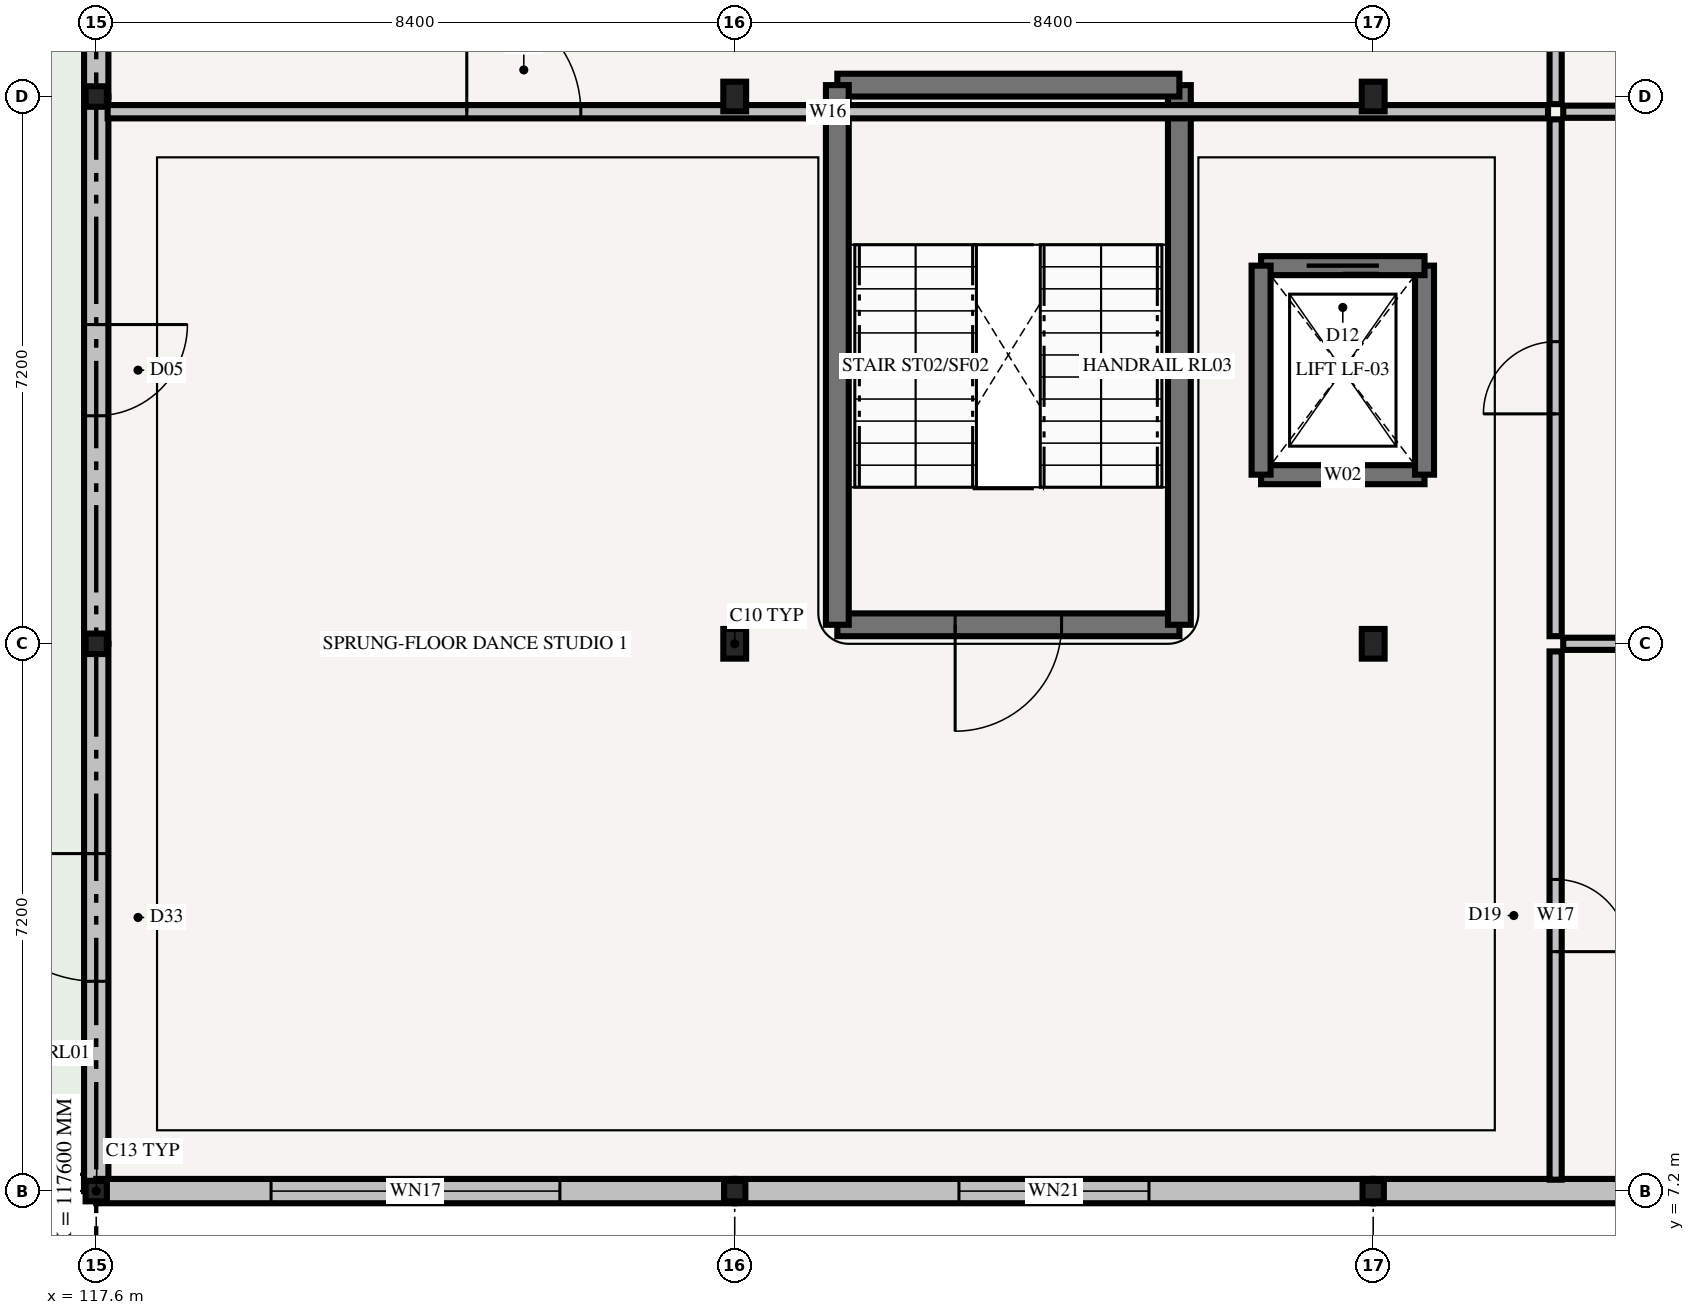
"""IFC4 building model, lengths in metres.
Left out: names, types, materials, properties, quantities, classifications, styles, units other than length and angle.
Written with IfcOpenShell. Run it as: python <this file> out.ifc"""

import sys

from ifc_helpers import new_model, si_unit, direction, frame, frame_2d, origin, origin_2d, place, context, subcontext, project, spatial, rectangle, i_section, extrude, element, fill, save


model = new_model("IFC4")
c1 = context("Model", 3, precision=1e-05, world=origin(), true_north=direction((0.0, 1.0)))
c2 = subcontext(c1, "Body", "Model", "MODEL_VIEW")
j1 = project(units=[si_unit("LENGTHUNIT", "METRE"), si_unit("PLANEANGLEUNIT", "RADIAN")], contexts=[c1])
p1 = place(None, origin())
s1 = spatial("IfcSite", under=j1, at=p1, CompositionType="ELEMENT")
p2 = place(p1, origin())
s2 = spatial("IfcBuilding", under=s1, at=p2, CompositionType="ELEMENT")
p3 = place(p2, frame((0.0, 0.0, 8.7)))
s3 = spatial("IfcBuildingStorey", under=s2, at=p3, CompositionType="ELEMENT", Elevation=8.7)
for number, where, z_axis, x_axis in (
    (1, (117.6, 7.2, 0.0), (0.0, 0.0, 1.0), (1.0, 0.0, 0.0)),
    (2, (117.6, 14.4, 0.0), (0.0, 0.0, 1.0), (1.0, 0.0, 0.0)),
    (3, (117.6, 21.6, 0.0), (0.0, 0.0, 1.0), (1.0, 0.0, 0.0)),
    (4, (126.0, 7.2, 0.0), (0.0, 0.0, 1.0), (1.0, 0.0, 0.0)),
):
    element("IfcColumn", number, at=place(p3, frame(where, z_axis=z_axis, x_axis=x_axis)), inside=s3, PredefinedType="COLUMN", context=c2, shape_type="SweptSolid", body=[
        extrude(i_section(OverallWidth=0.28, OverallDepth=0.27, WebThickness=0.008, FlangeThickness=0.013, FilletRadius=0.024, at=origin_2d()), origin(), (0.0, 0.0, 1.0), 4.2),
    ])
for number, where, z_axis, x_axis in (
    (5, (126.0, 14.4, 0.0), (0.0, 0.0, 1.0), (1.0, 0.0, 0.0)),
    (6, (126.0, 21.6, 0.0), (0.0, 0.0, 1.0), (1.0, 0.0, 0.0)),
):
    element("IfcColumn", number, at=place(p3, frame(where, z_axis=z_axis, x_axis=x_axis)), inside=s3, PredefinedType="COLUMN", context=c2, shape_type="SweptSolid", body=[
        extrude(i_section(OverallWidth=0.3, OverallDepth=0.39, WebThickness=0.011, FlangeThickness=0.019, FilletRadius=0.027, at=origin_2d()), origin(), (0.0, 0.0, 1.0), 4.2),
    ])
p4 = place(p3, frame((134.4, 7.2, 0.0), z_axis=(0.0, 0.0, 1.0), x_axis=(1.0, 0.0, 0.0)))
e7 = element("IfcColumn", 7, at=p4, inside=s3, PredefinedType="COLUMN", context=c2, shape_type="SweptSolid", body=[
    extrude(i_section(OverallWidth=0.28, OverallDepth=0.27, WebThickness=0.008, FlangeThickness=0.013, FilletRadius=0.024, at=origin_2d()), origin(), (0.0, 0.0, 1.0), 4.2),
])
for number, where, z_axis, x_axis in (
    (8, (134.4, 14.4, 0.0), (0.0, 0.0, 1.0), (1.0, 0.0, 0.0)),
    (9, (134.4, 21.6, 0.0), (0.0, 0.0, 1.0), (1.0, 0.0, 0.0)),
):
    element("IfcColumn", number, at=place(p3, frame(where, z_axis=z_axis, x_axis=x_axis)), inside=s3, PredefinedType="COLUMN", context=c2, shape_type="SweptSolid", body=[
        extrude(i_section(OverallWidth=0.3, OverallDepth=0.39, WebThickness=0.011, FlangeThickness=0.019, FilletRadius=0.027, at=origin_2d()), origin(), (0.0, 0.0, 1.0), 4.2),
    ])
p5 = place(p3, frame((117.6, 28.8, 0.0), z_axis=(0.0, 0.0, 1.0), x_axis=(0.0, -1.0, 0.0)))
e10 = element("IfcWall", 10, at=p5, inside=s3, PredefinedType="STANDARD", context=c2, shape_type="SweptSolid", body=[
    extrude(rectangle(XDim=7.2, YDim=0.32, at=frame_2d((3.6, 0.0))), origin(), (0.0, 0.0, 1.0), 3.305),
])
p6 = place(p5, frame((2.8, 0.0, 0.0)))
e11 = element("IfcOpeningElement", 11, at=p6, cuts=e10, PredefinedType="OPENING", context=c2, shape_type="SweptSolid", body=[
    extrude(rectangle(XDim=1.6, YDim=2.3, at=frame_2d((0.8, 1.15))), frame((0.0, 0.185, 0.0), z_axis=(0.0, -1.0, 0.0), x_axis=(1.0, 0.0, 0.0)), (0.0, 0.0, 1.0), 0.37),
])
p7 = place(p3, frame((117.6, 21.6, 0.0), z_axis=(0.0, 0.0, 1.0), x_axis=(0.0, -1.0, 0.0)))
e12 = element("IfcWall", 12, at=p7, inside=s3, PredefinedType="STANDARD", context=c2, shape_type="SweptSolid", body=[
    extrude(rectangle(XDim=7.2, YDim=0.32, at=frame_2d((3.6, 0.0))), origin(), (0.0, 0.0, 1.0), 3.405),
])
p8 = place(p7, frame((3.0, 0.0, 0.0)))
e13 = element("IfcOpeningElement", 13, at=p8, cuts=e12, PredefinedType="OPENING", context=c2, shape_type="SweptSolid", body=[
    extrude(rectangle(XDim=1.2, YDim=2.25, at=frame_2d((0.6, 1.125))), frame((0.0, 0.185, 0.0), z_axis=(0.0, -1.0, 0.0), x_axis=(1.0, 0.0, 0.0)), (0.0, 0.0, 1.0), 0.37),
])
p9 = place(p3, frame((117.6, 14.4, 0.0), z_axis=(0.0, 0.0, 1.0), x_axis=(0.0, -1.0, 0.0)))
e14 = element("IfcWall", 14, at=p9, inside=s3, PredefinedType="STANDARD", context=c2, shape_type="SweptSolid", body=[
    extrude(rectangle(XDim=7.2, YDim=0.32, at=frame_2d((3.6, 0.0))), origin(), (0.0, 0.0, 1.0), 3.455),
])
p10 = place(p9, frame((2.76, 0.0, 0.0)))
e15 = element("IfcOpeningElement", 15, at=p10, cuts=e14, PredefinedType="OPENING", context=c2, shape_type="SweptSolid", body=[
    extrude(rectangle(XDim=1.68, YDim=2.3, at=frame_2d((0.84, 1.15))), frame((0.0, 0.185, 0.0), z_axis=(0.0, -1.0, 0.0), x_axis=(1.0, 0.0, 0.0)), (0.0, 0.0, 1.0), 0.37),
])
p11 = place(p3, frame((117.6, 7.2, 0.0), z_axis=(0.0, 0.0, 1.0), x_axis=(1.0, 0.0, 0.0)))
e16 = element("IfcWall", 16, at=p11, inside=s3, PredefinedType="STANDARD", context=c2, shape_type="SweptSolid", body=[
    extrude(rectangle(XDim=8.4, YDim=0.32, at=frame_2d((4.2, 0.0))), origin(), (0.0, 0.0, 1.0), 3.405),
])
p12 = place(p11, frame((2.3, 0.0, 0.85)))
e17 = element("IfcOpeningElement", 17, at=p12, cuts=e16, PredefinedType="OPENING", context=c2, shape_type="SweptSolid", body=[
    extrude(rectangle(XDim=3.8, YDim=2.1, at=frame_2d((1.9, 1.05))), frame((0.0, 0.185, 0.0), z_axis=(0.0, -1.0, 0.0), x_axis=(1.0, 0.0, 0.0)), (0.0, 0.0, 1.0), 0.37),
])
p13 = place(p3, frame((126.0, 7.2, 0.0), z_axis=(0.0, 0.0, 1.0), x_axis=(1.0, 0.0, 0.0)))
e18 = element("IfcWall", 18, at=p13, inside=s3, PredefinedType="STANDARD", context=c2, shape_type="SweptSolid", body=[
    extrude(rectangle(XDim=8.4, YDim=0.32, at=frame_2d((4.2, 0.0))), origin(), (0.0, 0.0, 1.0), 3.405),
])
p14 = place(p13, frame((2.95, 0.0, 0.85)))
e19 = element("IfcOpeningElement", 19, at=p14, cuts=e18, PredefinedType="OPENING", context=c2, shape_type="SweptSolid", body=[
    extrude(rectangle(XDim=2.5, YDim=1.65, at=frame_2d((1.25, 0.825))), frame((0.0, 0.185, 0.0), z_axis=(0.0, -1.0, 0.0), x_axis=(1.0, 0.0, 0.0)), (0.0, 0.0, 1.0), 0.37),
])
p15 = place(p3, frame((134.4, 7.2, 0.0), z_axis=(0.0, 0.0, 1.0), x_axis=(1.0, 0.0, 0.0)))
e20 = element("IfcWall", 20, at=p15, inside=s3, PredefinedType="STANDARD", context=c2, shape_type="SweptSolid", body=[
    extrude(rectangle(XDim=8.4, YDim=0.32, at=frame_2d((4.2, 0.0))), origin(), (0.0, 0.0, 1.0), 3.455),
])
p16 = place(p15, frame((3.5, 0.0, 0.85)))
e21 = element("IfcOpeningElement", 21, at=p16, cuts=e20, PredefinedType="OPENING", context=c2, shape_type="SweptSolid", body=[
    extrude(rectangle(XDim=1.4, YDim=1.2, at=frame_2d((0.7, 0.6))), frame((0.0, 0.185, 0.0), z_axis=(0.0, -1.0, 0.0), x_axis=(1.0, 0.0, 0.0)), (0.0, 0.0, 1.0), 0.37),
])
p17 = place(p3, frame((127.35, 14.65, 0.0), z_axis=(0.0, 0.0, 1.0), x_axis=(1.0, 0.0, 0.0)))
e22 = element("IfcWall", 22, at=p17, inside=s3, PredefinedType="SHEAR", context=c2, shape_type="SweptSolid", body=[
    extrude(rectangle(XDim=4.5, YDim=0.3, at=frame_2d((2.25, 0.0))), origin(), (0.0, 0.0, 1.0), 4.0),
])
p18 = place(p17, frame((1.55, 0.0, 0.0)))
e23 = element("IfcOpeningElement", 23, at=p18, cuts=e22, PredefinedType="OPENING", context=c2, shape_type="SweptSolid", body=[
    extrude(rectangle(XDim=1.4, YDim=2.2, at=frame_2d((0.7, 1.1))), frame((0.0, 0.175, 0.0), z_axis=(0.0, -1.0, 0.0), x_axis=(1.0, 0.0, 0.0)), (0.0, 0.0, 1.0), 0.35),
])
p19 = place(p3, frame((131.85, 14.65, 0.0), z_axis=(0.0, 0.0, 1.0), x_axis=(0.0, 1.0, 0.0)))
e24 = element("IfcWall", 24, at=p19, inside=s3, PredefinedType="SHEAR", context=c2, shape_type="SweptSolid", body=[
    extrude(rectangle(XDim=7.1, YDim=0.3, at=frame_2d((3.55, 0.0))), origin(), (0.0, 0.0, 1.0), 4.0),
])
p20 = place(p3, frame((131.85, 21.75, 0.0), z_axis=(0.0, 0.0, 1.0), x_axis=(-1.0, 0.0, 0.0)))
e25 = element("IfcWall", 25, at=p20, inside=s3, PredefinedType="SHEAR", context=c2, shape_type="SweptSolid", body=[
    extrude(rectangle(XDim=4.5, YDim=0.3, at=frame_2d((2.25, 0.0))), origin(), (0.0, 0.0, 1.0), 4.0),
])
p21 = place(p3, frame((127.35, 21.75, 0.0), z_axis=(0.0, 0.0, 1.0), x_axis=(0.0, -1.0, 0.0)))
e26 = element("IfcWall", 26, at=p21, inside=s3, PredefinedType="SHEAR", context=c2, shape_type="SweptSolid", body=[
    extrude(rectangle(XDim=7.1, YDim=0.3, at=frame_2d((3.55, 0.0))), origin(), (0.0, 0.0, 1.0), 4.0),
])
p22 = place(p3, frame((132.925, 16.625, 0.0), z_axis=(0.0, 0.0, 1.0), x_axis=(1.0, 0.0, 0.0)))
e27 = element("IfcWall", 27, at=p22, inside=s3, PredefinedType="SHEAR", context=c2, shape_type="SweptSolid", body=[
    extrude(rectangle(XDim=2.15, YDim=0.25, at=frame_2d((1.075, 0.0))), origin(), (0.0, 0.0, 1.0), 4.0),
])
p23 = place(p3, frame((135.075, 16.625, 0.0), z_axis=(0.0, 0.0, 1.0), x_axis=(0.0, 1.0, 0.0)))
e28 = element("IfcWall", 28, at=p23, inside=s3, PredefinedType="SHEAR", context=c2, shape_type="SweptSolid", body=[
    extrude(rectangle(XDim=2.75, YDim=0.25, at=frame_2d((1.375, 0.0))), origin(), (0.0, 0.0, 1.0), 4.0),
])
p24 = place(p3, frame((135.075, 19.375, 0.0), z_axis=(0.0, 0.0, 1.0), x_axis=(-1.0, 0.0, 0.0)))
e29 = element("IfcWall", 29, at=p24, inside=s3, PredefinedType="SHEAR", context=c2, shape_type="SweptSolid", body=[
    extrude(rectangle(XDim=2.15, YDim=0.25, at=frame_2d((1.075, 0.0))), origin(), (0.0, 0.0, 1.0), 4.0),
])
p25 = place(p24, frame((0.6, 0.0, 0.0)))
e30 = element("IfcOpeningElement", 30, at=p25, cuts=e29, PredefinedType="OPENING", context=c2, shape_type="SweptSolid", body=[
    extrude(rectangle(XDim=0.95, YDim=2.1, at=frame_2d((0.475, 1.05))), frame((0.0, 0.15, 0.0), z_axis=(0.0, -1.0, 0.0), x_axis=(1.0, 0.0, 0.0)), (0.0, 0.0, 1.0), 0.3),
])
p26 = place(p3, frame((132.925, 19.375, 0.0), z_axis=(0.0, 0.0, 1.0), x_axis=(0.0, -1.0, 0.0)))
e31 = element("IfcWall", 31, at=p26, inside=s3, PredefinedType="SHEAR", context=c2, shape_type="SweptSolid", body=[
    extrude(rectangle(XDim=2.75, YDim=0.25, at=frame_2d((1.375, 0.0))), origin(), (0.0, 0.0, 1.0), 4.0),
])
p27 = place(p3, frame((117.75, 21.4, 0.0), z_axis=(0.0, 0.0, 1.0), x_axis=(1.0, 0.0, 0.0)))
e32 = element("IfcWall", 32, at=p27, inside=s3, PredefinedType="PARTITIONING", context=c2, shape_type="SweptSolid", body=[
    extrude(rectangle(XDim=18.95, YDim=0.175, at=frame_2d((9.475, 0.0))), origin(), (0.0, 0.0, 1.0), 3.32),
])
p28 = place(p27, frame((4.725, 0.0, 0.0)))
e33 = element("IfcOpeningElement", 33, at=p28, cuts=e32, PredefinedType="OPENING", context=c2, shape_type="SweptSolid", body=[
    extrude(rectangle(XDim=1.5, YDim=2.2, at=frame_2d((0.75, 1.1))), frame((0.0, 0.112, 0.0), z_axis=(0.0, -1.0, 0.0), x_axis=(1.0, 0.0, 0.0)), (0.0, 0.0, 1.0), 0.225),
])
p29 = place(p3, frame((136.8, 7.35, 0.0), z_axis=(0.0, 0.0, 1.0), x_axis=(0.0, 1.0, 0.0)))
e34 = element("IfcWall", 34, at=p29, inside=s3, PredefinedType="PARTITIONING", context=c2, shape_type="SweptSolid", body=[
    extrude(rectangle(XDim=6.95, YDim=0.16, at=frame_2d((3.475, 0.0))), origin(), (0.0, 0.0, 1.0), 3.32),
])
p30 = place(p29, frame((3.0, 0.0, 0.0)))
e35 = element("IfcOpeningElement", 35, at=p30, cuts=e34, PredefinedType="OPENING", context=c2, shape_type="SweptSolid", body=[
    extrude(rectangle(XDim=0.95, YDim=2.15, at=frame_2d((0.475, 1.075))), frame((0.0, 0.105, 0.0), z_axis=(0.0, -1.0, 0.0), x_axis=(1.0, 0.0, 0.0)), (0.0, 0.0, 1.0), 0.21),
])
p31 = place(p3, frame((136.8, 14.5, 0.0), z_axis=(0.0, 0.0, 1.0), x_axis=(0.0, 1.0, 0.0)))
e36 = element("IfcWall", 36, at=p31, inside=s3, PredefinedType="PARTITIONING", context=c2, shape_type="SweptSolid", body=[
    extrude(rectangle(XDim=6.8, YDim=0.16, at=frame_2d((3.4, 0.0))), origin(), (0.0, 0.0, 1.0), 3.32),
])
p32 = place(p31, frame((2.925, 0.0, 0.0)))
e37 = element("IfcOpeningElement", 37, at=p32, cuts=e36, PredefinedType="OPENING", context=c2, shape_type="SweptSolid", body=[
    extrude(rectangle(XDim=0.95, YDim=2.15, at=frame_2d((0.475, 1.075))), frame((0.0, 0.105, 0.0), z_axis=(0.0, -1.0, 0.0), x_axis=(1.0, 0.0, 0.0)), (0.0, 0.0, 1.0), 0.21),
])
p33 = place(p3, frame((136.8, 21.5, 0.0), z_axis=(0.0, 0.0, 1.0), x_axis=(0.0, 1.0, 0.0)))
e38 = element("IfcWall", 38, at=p33, inside=s3, PredefinedType="PARTITIONING", context=c2, shape_type="SweptSolid", body=[
    extrude(rectangle(XDim=5.3, YDim=0.16, at=frame_2d((2.65, 0.0))), origin(), (0.0, 0.0, 1.0), 3.32),
])
p34 = place(p33, frame((2.15, 0.0, 0.0)))
e39 = element("IfcOpeningElement", 39, at=p34, cuts=e38, PredefinedType="OPENING", context=c2, shape_type="SweptSolid", body=[
    extrude(rectangle(XDim=1.0, YDim=2.15, at=frame_2d((0.5, 1.075))), frame((0.0, 0.105, 0.0), z_axis=(0.0, -1.0, 0.0), x_axis=(1.0, 0.0, 0.0)), (0.0, 0.0, 1.0), 0.21),
])
for number, where, z_axis, x_axis in (
    (40, (136.9, 14.4, 0.0), (0.0, 0.0, 1.0), (1.0, 0.0, 0.0)),
    (41, (136.9, 21.4, 0.0), (0.0, 0.0, 1.0), (1.0, 0.0, 0.0)),
):
    element("IfcWall", number, at=place(p3, frame(where, z_axis=z_axis, x_axis=x_axis)), inside=s3, PredefinedType="PARTITIONING", context=c2, shape_type="SweptSolid", body=[
        extrude(rectangle(XDim=5.9, YDim=0.16, at=frame_2d((2.95, 0.0))), origin(), (0.0, 0.0, 1.0), 3.32),
    ])
p35 = place(p8, frame((1.2, 0.0, 0.0), z_axis=(0.0, 0.0, 1.0), x_axis=(-1.0, 0.0, 0.0)))
e42 = element("IfcDoor", 42, at=p35, inside=s3, OperationType="SINGLE_SWING_LEFT", PredefinedType="DOOR", context=c2, shape_type="SweptSolid", body=[
    extrude(rectangle(XDim=1.2, YDim=2.25, at=frame_2d((0.6, 1.125))), frame((0.0, 0.025, 0.0), z_axis=(0.0, -1.0, 0.0), x_axis=(1.0, 0.0, 0.0)), (0.0, 0.0, 1.0), 0.05),
])
fill(e13, e42)
p36 = place(p10, frame((1.68, 0.0, 0.0), z_axis=(0.0, 0.0, 1.0), x_axis=(-1.0, 0.0, 0.0)))
e43 = element("IfcDoor", 43, at=p36, inside=s3, OperationType="SINGLE_SWING_RIGHT", PredefinedType="DOOR", context=c2, shape_type="SweptSolid", body=[
    extrude(rectangle(XDim=1.68, YDim=2.3, at=frame_2d((0.84, 1.15))), frame((0.0, 0.025, 0.0), z_axis=(0.0, -1.0, 0.0), x_axis=(1.0, 0.0, 0.0)), (0.0, 0.0, 1.0), 0.05),
])
fill(e15, e43)
p37 = place(p12, origin())
e44 = element("IfcWindow", 44, at=p37, inside=s3, PartitioningType="SINGLE_PANEL", PredefinedType="WINDOW", context=c2, shape_type="SweptSolid", body=[
    extrude(rectangle(XDim=3.8, YDim=2.1, at=frame_2d((1.9, 1.05))), frame((0.0, 0.03, 0.0), z_axis=(0.0, -1.0, 0.0), x_axis=(1.0, 0.0, 0.0)), (0.0, 0.0, 1.0), 0.06),
])
fill(e17, e44)
p38 = place(p14, origin())
e45 = element("IfcWindow", 45, at=p38, inside=s3, PartitioningType="SINGLE_PANEL", PredefinedType="WINDOW", context=c2, shape_type="SweptSolid", body=[
    extrude(rectangle(XDim=2.5, YDim=1.65, at=frame_2d((1.25, 0.825))), frame((0.0, 0.03, 0.0), z_axis=(0.0, -1.0, 0.0), x_axis=(1.0, 0.0, 0.0)), (0.0, 0.0, 1.0), 0.06),
])
fill(e19, e45)
p39 = place(p18, frame((1.4, 0.0, 0.0), z_axis=(0.0, 0.0, 1.0), x_axis=(-1.0, 0.0, 0.0)))
e46 = element("IfcDoor", 46, at=p39, inside=s3, OperationType="SINGLE_SWING_RIGHT", PredefinedType="DOOR", context=c2, shape_type="SweptSolid", body=[
    extrude(rectangle(XDim=1.4, YDim=2.2, at=frame_2d((0.7, 1.1))), frame((0.0, 0.025, 0.0), z_axis=(0.0, -1.0, 0.0), x_axis=(1.0, 0.0, 0.0)), (0.0, 0.0, 1.0), 0.05),
])
fill(e23, e46)
p40 = place(p25, origin())
e47 = element("IfcDoor", 47, at=p40, inside=s3, OperationType="SLIDING_TO_LEFT", PredefinedType="DOOR", context=c2, shape_type="SweptSolid", body=[
    extrude(rectangle(XDim=0.95, YDim=2.1, at=frame_2d((0.475, 1.05))), frame((0.0, 0.025, 0.0), z_axis=(0.0, -1.0, 0.0), x_axis=(1.0, 0.0, 0.0)), (0.0, 0.0, 1.0), 0.05),
])
fill(e30, e47)
p41 = place(p28, origin())
e48 = element("IfcDoor", 48, at=p41, inside=s3, OperationType="DOUBLE_DOOR_SINGLE_SWING", PredefinedType="DOOR", context=c2, shape_type="SweptSolid", body=[
    extrude(rectangle(XDim=1.5, YDim=2.2, at=frame_2d((0.75, 1.1))), frame((0.0, 0.025, 0.0), z_axis=(0.0, -1.0, 0.0), x_axis=(1.0, 0.0, 0.0)), (0.0, 0.0, 1.0), 0.05),
])
fill(e33, e48)
p42 = place(p30, origin())
e49 = element("IfcDoor", 49, at=p42, inside=s3, OperationType="SINGLE_SWING_RIGHT", PredefinedType="DOOR", context=c2, shape_type="SweptSolid", body=[
    extrude(rectangle(XDim=0.95, YDim=2.15, at=frame_2d((0.475, 1.075))), frame((0.0, 0.025, 0.0), z_axis=(0.0, -1.0, 0.0), x_axis=(1.0, 0.0, 0.0)), (0.0, 0.0, 1.0), 0.05),
])
fill(e35, e49)
p43 = place(p32, origin())
e50 = element("IfcDoor", 50, at=p43, inside=s3, OperationType="SINGLE_SWING_LEFT", PredefinedType="DOOR", context=c2, shape_type="SweptSolid", body=[
    extrude(rectangle(XDim=0.95, YDim=2.15, at=frame_2d((0.475, 1.075))), frame((0.0, 0.025, 0.0), z_axis=(0.0, -1.0, 0.0), x_axis=(1.0, 0.0, 0.0)), (0.0, 0.0, 1.0), 0.05),
])
fill(e37, e50)
save(model, sys.argv[1])
